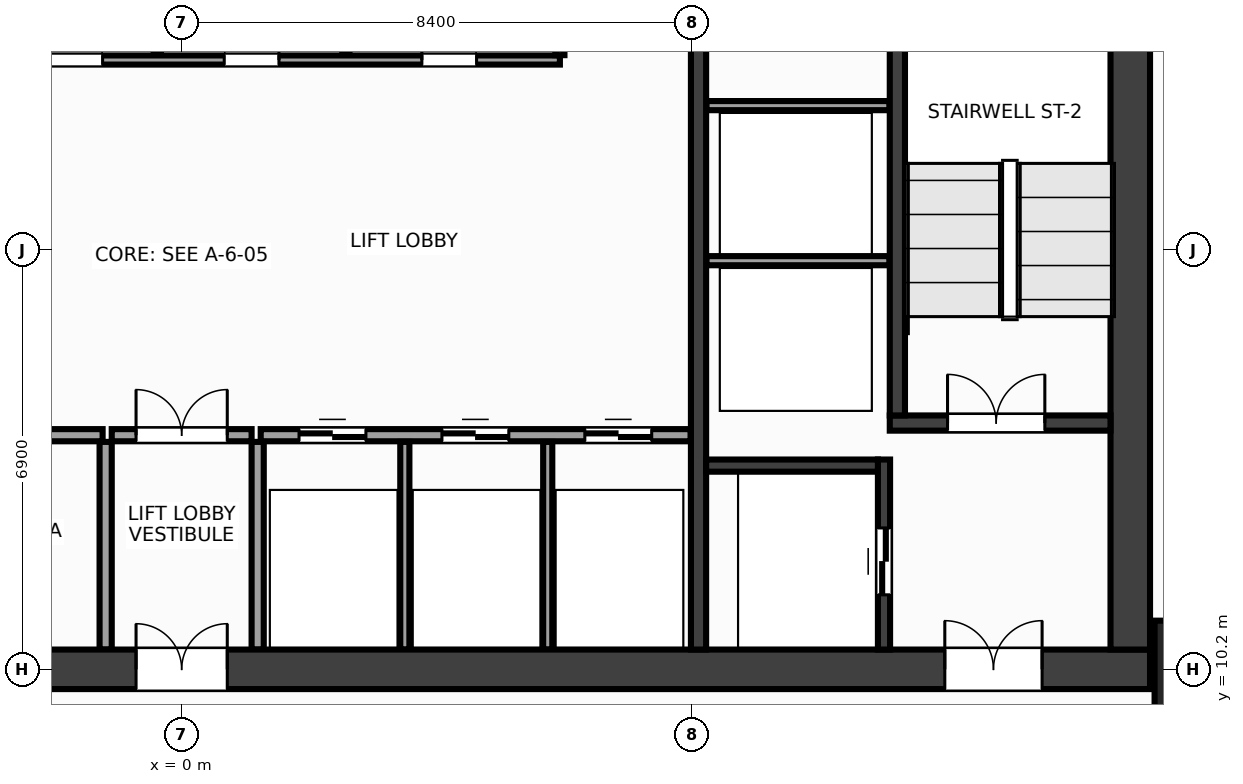
"""IFC4 building model, lengths in metres.
Left out: names, types, materials, properties, quantities, classifications, styles, units other than length and angle.
Written with IfcOpenShell. Run it as: python <this file> out.ifc"""

import sys

from ifc_helpers import new_model, si_unit, direction, frame, frame_2d, origin, origin_2d, place, context, subcontext, project, spatial, rectangle, extrude, source, transform, mapped, element, fill, save


model = new_model("IFC4")
c1 = context("Model", 3, precision=1e-05, world=origin(), true_north=direction((0.0, 1.0)))
c2 = subcontext(c1, "Body", "Model", "MODEL_VIEW")
j1 = project(units=[si_unit("LENGTHUNIT", "METRE"), si_unit("PLANEANGLEUNIT", "RADIAN")], contexts=[c1])
p1 = place(None, origin())
s1 = spatial("IfcSite", under=j1, at=p1, CompositionType="ELEMENT")
p2 = place(p1, origin())
s2 = spatial("IfcBuilding", under=s1, at=p2, CompositionType="ELEMENT")
p3 = place(p2, frame((0.0, 0.0, 135.2)))
s3 = spatial("IfcBuildingStorey", under=s2, at=p3, CompositionType="ELEMENT", Elevation=135.2)
m1 = source(origin(), c2, "Body", "SweptSolid", [
    extrude(rectangle(XDim=31.85, YDim=0.65, at=frame_2d((15.925, 0.0))), origin(), (0.0, 0.0, 1.0), 3.6),
])
p4 = place(p3, frame((-15.925, 10.2, 0.0), z_axis=(0.0, 0.0, 1.0), x_axis=(1.0, 0.0, 0.0)))
e1 = element("IfcWall", 1, at=p4, inside=s3, PredefinedType="SHEAR", context=c2, shape_type="MappedRepresentation", body=[
    mapped(m1, transform((0.0, 0.0, 0.0), x_axis=(1.0, 0.0, 0.0), y_axis=(0.0, 1.0, 0.0), z_axis=(0.0, 0.0, 1.0), scale=1.0)),
])
p5 = place(p4, frame((1.775, 0.0, 0.0)))
e2 = element("IfcOpeningElement", 2, at=p5, cuts=e1, PredefinedType="OPENING", context=c2, shape_type="SweptSolid", body=[
    extrude(rectangle(XDim=1.6, YDim=2.15, at=frame_2d((0.8, 1.075))), frame((0.0, 0.337, 0.0), z_axis=(0.0, -1.0, 0.0), x_axis=(1.0, 0.0, 0.0)), (0.0, 0.0, 1.0), 0.674),
])
p6 = place(p4, frame((28.475, 0.0, 0.0)))
e3 = element("IfcOpeningElement", 3, at=p6, cuts=e1, PredefinedType="OPENING", context=c2, shape_type="SweptSolid", body=[
    extrude(rectangle(XDim=1.6, YDim=2.15, at=frame_2d((0.8, 1.075))), frame((0.0, 0.337, 0.0), z_axis=(0.0, -1.0, 0.0), x_axis=(1.0, 0.0, 0.0)), (0.0, 0.0, 1.0), 0.674),
])
p7 = place(p4, frame((15.175, 0.0, 0.0)))
e4 = element("IfcOpeningElement", 4, at=p7, cuts=e1, PredefinedType="OPENING", context=c2, shape_type="SweptSolid", body=[
    extrude(rectangle(XDim=1.5, YDim=2.2, at=frame_2d((0.75, 1.1))), frame((0.0, 0.337, 0.0), z_axis=(0.0, -1.0, 0.0), x_axis=(1.0, 0.0, 0.0)), (0.0, 0.0, 1.0), 0.674),
])
m2 = source(origin(), c2, "Body", "SweptSolid", [
    extrude(rectangle(XDim=12.95, YDim=0.65, at=frame_2d((6.475, 0.0))), origin(), (0.0, 0.0, 1.0), 3.6),
])
p8 = place(p3, frame((15.6, 10.525, 0.0), z_axis=(0.0, 0.0, 1.0), x_axis=(0.0, 1.0, 0.0)))
e5 = element("IfcWall", 5, at=p8, inside=s3, PredefinedType="SHEAR", context=c2, shape_type="MappedRepresentation", body=[
    mapped(m2, transform((0.0, 0.0, 0.0), x_axis=(1.0, 0.0, 0.0), y_axis=(0.0, 1.0, 0.0), z_axis=(0.0, 0.0, 1.0), scale=1.0)),
])
m3 = source(origin(), c2, "Body", "SweptSolid", [
    extrude(rectangle(XDim=12.95, YDim=0.25, at=frame_2d((6.475, 0.0))), origin(), (0.0, 0.0, 1.0), 3.6),
])
p9 = place(p3, frame((8.5, 10.525, 0.0), z_axis=(0.0, 0.0, 1.0), x_axis=(0.0, 1.0, 0.0)))
e6 = element("IfcWall", 6, at=p9, inside=s3, PredefinedType="SHEAR", context=c2, shape_type="MappedRepresentation", body=[
    mapped(m3, transform((0.0, 0.0, 0.0), x_axis=(1.0, 0.0, 0.0), y_axis=(0.0, 1.0, 0.0), z_axis=(0.0, 0.0, 1.0), scale=1.0)),
])
p10 = place(p9, frame((9.925, 0.0, 0.0)))
e7 = element("IfcOpeningElement", 7, at=p10, cuts=e6, PredefinedType="OPENING", context=c2, shape_type="SweptSolid", body=[
    extrude(rectangle(XDim=0.95, YDim=2.15, at=frame_2d((0.475, 1.075))), frame((0.0, 0.137, 0.0), z_axis=(0.0, -1.0, 0.0), x_axis=(1.0, 0.0, 0.0)), (0.0, 0.0, 1.0), 0.274),
])
m4 = source(origin(), c2, "Body", "SweptSolid", [
    extrude(rectangle(XDim=3.63, YDim=0.25, at=frame_2d((1.815, 0.0))), origin(), (0.0, 0.0, 1.0), 3.6),
])
p11 = place(p3, frame((11.645, 14.25, 0.0), z_axis=(0.0, 0.0, 1.0), x_axis=(1.0, 0.0, 0.0)))
e8 = element("IfcWall", 8, at=p11, inside=s3, PredefinedType="SHEAR", context=c2, shape_type="MappedRepresentation", body=[
    mapped(m4, transform((0.0, 0.0, 0.0), x_axis=(1.0, 0.0, 0.0), y_axis=(0.0, 1.0, 0.0), z_axis=(0.0, 0.0, 1.0), scale=1.0)),
])
p12 = place(p11, frame((0.95, 0.0, 0.0)))
e9 = element("IfcOpeningElement", 9, at=p12, cuts=e8, PredefinedType="OPENING", context=c2, shape_type="SweptSolid", body=[
    extrude(rectangle(XDim=1.6, YDim=2.15, at=frame_2d((0.8, 1.075))), frame((0.0, 0.137, 0.0), z_axis=(0.0, -1.0, 0.0), x_axis=(1.0, 0.0, 0.0)), (0.0, 0.0, 1.0), 0.274),
])
m5 = source(origin(), c2, "Body", "SweptSolid", [
    extrude(rectangle(XDim=9.1, YDim=0.25, at=frame_2d((4.55, 0.0))), origin(), (0.0, 0.0, 1.0), 3.6),
])
p13 = place(p3, frame((11.77, 14.375, 0.0), z_axis=(0.0, 0.0, 1.0), x_axis=(0.0, 1.0, 0.0)))
e10 = element("IfcWall", 10, at=p13, inside=s3, PredefinedType="SHEAR", context=c2, shape_type="MappedRepresentation", body=[
    mapped(m5, transform((0.0, 0.0, 0.0), x_axis=(1.0, 0.0, 0.0), y_axis=(0.0, 1.0, 0.0), z_axis=(0.0, 0.0, 1.0), scale=1.0)),
])
m6 = source(origin(), c2, "Body", "SweptSolid", [
    extrude(rectangle(XDim=3.125, YDim=0.2, at=frame_2d((1.562, 0.0))), origin(), (0.0, 0.0, 1.0), 3.6),
])
p14 = place(p3, frame((11.55, 10.525, 0.0), z_axis=(0.0, 0.0, 1.0), x_axis=(0.0, 1.0, 0.0)))
e11 = element("IfcWall", 11, at=p14, inside=s3, PredefinedType="SHEAR", context=c2, shape_type="MappedRepresentation", body=[
    mapped(m6, transform((0.0, 0.0, 0.0), x_axis=(1.0, 0.0, 0.0), y_axis=(0.0, 1.0, 0.0), z_axis=(0.0, 0.0, 1.0), scale=1.0)),
])
p15 = place(p14, frame((0.9, 0.0, 0.0)))
e12 = element("IfcOpeningElement", 12, at=p15, cuts=e11, PredefinedType="OPENING", context=c2, shape_type="SweptSolid", body=[
    extrude(rectangle(XDim=1.1, YDim=2.15, at=frame_2d((0.55, 1.075))), frame((0.0, 0.112, 0.0), z_axis=(0.0, -1.0, 0.0), x_axis=(1.0, 0.0, 0.0)), (0.0, 0.0, 1.0), 0.224),
])
m7 = source(origin(), c2, "Body", "SweptSolid", [
    extrude(rectangle(XDim=2.825, YDim=0.2, at=frame_2d((1.413, 0.0))), origin(), (0.0, 0.0, 1.0), 3.6),
])
p16 = place(p3, frame((8.625, 13.55, 0.0), z_axis=(0.0, 0.0, 1.0), x_axis=(1.0, 0.0, 0.0)))
e13 = element("IfcWall", 13, at=p16, inside=s3, PredefinedType="SHEAR", context=c2, shape_type="MappedRepresentation", body=[
    mapped(m7, transform((0.0, 0.0, 0.0), x_axis=(1.0, 0.0, 0.0), y_axis=(0.0, 1.0, 0.0), z_axis=(0.0, 0.0, 1.0), scale=1.0)),
])
m8 = source(origin(), c2, "Body", "SweptSolid", [
    extrude(rectangle(XDim=1.6, YDim=1.6, at=origin_2d()), origin(), (0.0, 0.0, 1.0), 3.6),
])
p17 = place(p3, frame((16.8, 10.2, 0.0), z_axis=(0.0, 0.0, 1.0), x_axis=(1.0, 0.0, 0.0)))
e14 = element("IfcColumn", 14, at=p17, inside=s3, PredefinedType="COLUMN", context=c2, shape_type="MappedRepresentation", body=[
    mapped(m8, transform((0.0, 0.0, 0.0), x_axis=(1.0, 0.0, 0.0), y_axis=(0.0, 1.0, 0.0), z_axis=(0.0, 0.0, 1.0), scale=1.0)),
])
m9 = source(origin(), c2, "Body", "SweptSolid", [
    extrude(rectangle(XDim=3.01, YDim=0.15, at=frame_2d((1.505, 0.0))), origin(), (0.0, 0.0, 1.0), 3.38),
])
for number, where, z_axis, x_axis in (
    (15, (8.63, 16.92, 0.0), (0.0, 0.0, 1.0), (1.0, 0.0, 0.0)),
    (16, (8.63, 19.47, 0.0), (0.0, 0.0, 1.0), (1.0, 0.0, 0.0)),
):
    element("IfcWall", number, at=place(p3, frame(where, z_axis=z_axis, x_axis=x_axis)), inside=s3, PredefinedType="PARTITIONING", context=c2, shape_type="MappedRepresentation", body=[
        mapped(m9, transform((0.0, 0.0, 0.0), x_axis=(1.0, 0.0, 0.0), y_axis=(0.0, 1.0, 0.0), z_axis=(0.0, 0.0, 1.0), scale=1.0)),
    ])
m10 = source(origin(), c2, "Body", "SweptSolid", [
    extrude(rectangle(XDim=7.07, YDim=0.2, at=frame_2d((3.535, 0.0))), origin(), (0.0, 0.0, 1.0), 3.38),
])
p18 = place(p3, frame((-8.37, 14.05, 0.0), z_axis=(0.0, 0.0, 1.0), x_axis=(1.0, 0.0, 0.0)))
e17 = element("IfcWall", 17, at=p18, inside=s3, PredefinedType="PARTITIONING", context=c2, shape_type="MappedRepresentation", body=[
    mapped(m10, transform((0.0, 0.0, 0.0), x_axis=(1.0, 0.0, 0.0), y_axis=(0.0, 1.0, 0.0), z_axis=(0.0, 0.0, 1.0), scale=1.0)),
])
p19 = place(p18, frame((1.06, 0.0, 0.0)))
e18 = element("IfcOpeningElement", 18, at=p19, cuts=e17, PredefinedType="OPENING", context=c2, shape_type="SweptSolid", body=[
    extrude(rectangle(XDim=0.9, YDim=2.15, at=frame_2d((0.45, 1.075))), frame((0.0, 0.112, 0.0), z_axis=(0.0, -1.0, 0.0), x_axis=(1.0, 0.0, 0.0)), (0.0, 0.0, 1.0), 0.224),
])
p20 = place(p18, frame((4.51, 0.0, 0.0)))
e19 = element("IfcOpeningElement", 19, at=p20, cuts=e17, PredefinedType="OPENING", context=c2, shape_type="SweptSolid", body=[
    extrude(rectangle(XDim=0.9, YDim=2.15, at=frame_2d((0.45, 1.075))), frame((0.0, 0.112, 0.0), z_axis=(0.0, -1.0, 0.0), x_axis=(1.0, 0.0, 0.0)), (0.0, 0.0, 1.0), 0.224),
])
p21 = place(p3, frame((1.3, 14.05, 0.0), z_axis=(0.0, 0.0, 1.0), x_axis=(1.0, 0.0, 0.0)))
e20 = element("IfcWall", 20, at=p21, inside=s3, PredefinedType="PARTITIONING", context=c2, shape_type="MappedRepresentation", body=[
    mapped(m10, transform((0.0, 0.0, 0.0), x_axis=(1.0, 0.0, 0.0), y_axis=(0.0, 1.0, 0.0), z_axis=(0.0, 0.0, 1.0), scale=1.0)),
])
p22 = place(p21, frame((0.63, 0.0, 0.0)))
e21 = element("IfcOpeningElement", 21, at=p22, cuts=e20, PredefinedType="OPENING", context=c2, shape_type="SweptSolid", body=[
    extrude(rectangle(XDim=1.1, YDim=2.15, at=frame_2d((0.55, 1.075))), frame((0.0, 0.112, 0.0), z_axis=(0.0, -1.0, 0.0), x_axis=(1.0, 0.0, 0.0)), (0.0, 0.0, 1.0), 0.224),
])
p23 = place(p21, frame((2.98, 0.0, 0.0)))
e22 = element("IfcOpeningElement", 22, at=p23, cuts=e20, PredefinedType="OPENING", context=c2, shape_type="SweptSolid", body=[
    extrude(rectangle(XDim=1.1, YDim=2.15, at=frame_2d((0.55, 1.075))), frame((0.0, 0.112, 0.0), z_axis=(0.0, -1.0, 0.0), x_axis=(1.0, 0.0, 0.0)), (0.0, 0.0, 1.0), 0.224),
])
p24 = place(p21, frame((5.33, 0.0, 0.0)))
e23 = element("IfcOpeningElement", 23, at=p24, cuts=e20, PredefinedType="OPENING", context=c2, shape_type="SweptSolid", body=[
    extrude(rectangle(XDim=1.1, YDim=2.15, at=frame_2d((0.55, 1.075))), frame((0.0, 0.112, 0.0), z_axis=(0.0, -1.0, 0.0), x_axis=(1.0, 0.0, 0.0)), (0.0, 0.0, 1.0), 0.224),
])
m11 = source(origin(), c2, "Body", "SweptSolid", [
    extrude(rectangle(XDim=3.415, YDim=0.2, at=frame_2d((1.708, 0.0))), origin(), (0.0, 0.0, 1.0), 3.38),
])
for number, where, z_axis, x_axis in (
    (24, (-1.25, 10.525, 0.0), (0.0, 0.0, 1.0), (0.0, 1.0, 0.0)),
    (25, (1.25, 10.525, 0.0), (0.0, 0.0, 1.0), (0.0, 1.0, 0.0)),
):
    element("IfcWall", number, at=place(p3, frame(where, z_axis=z_axis, x_axis=x_axis)), inside=s3, PredefinedType="PARTITIONING", context=c2, shape_type="MappedRepresentation", body=[
        mapped(m11, transform((0.0, 0.0, 0.0), x_axis=(1.0, 0.0, 0.0), y_axis=(0.0, 1.0, 0.0), z_axis=(0.0, 0.0, 1.0), scale=1.0)),
    ])
m12 = source(origin(), c2, "Body", "SweptSolid", [
    extrude(rectangle(XDim=2.3, YDim=0.2, at=frame_2d((1.15, 0.0))), origin(), (0.0, 0.0, 1.0), 3.38),
])
p25 = place(p3, frame((-1.15, 14.05, 0.0), z_axis=(0.0, 0.0, 1.0), x_axis=(1.0, 0.0, 0.0)))
e26 = element("IfcWall", 26, at=p25, inside=s3, PredefinedType="PARTITIONING", context=c2, shape_type="MappedRepresentation", body=[
    mapped(m12, transform((0.0, 0.0, 0.0), x_axis=(1.0, 0.0, 0.0), y_axis=(0.0, 1.0, 0.0), z_axis=(0.0, 0.0, 1.0), scale=1.0)),
])
p26 = place(p25, frame((0.4, 0.0, 0.0)))
e27 = element("IfcOpeningElement", 27, at=p26, cuts=e26, PredefinedType="OPENING", context=c2, shape_type="SweptSolid", body=[
    extrude(rectangle(XDim=1.5, YDim=2.2, at=frame_2d((0.75, 1.1))), frame((0.0, 0.112, 0.0), z_axis=(0.0, -1.0, 0.0), x_axis=(1.0, 0.0, 0.0)), (0.0, 0.0, 1.0), 0.224),
])
m13 = source(origin(), c2, "Body", "SweptSolid", [
    extrude(rectangle(XDim=14.59, YDim=0.15, at=frame_2d((7.295, 0.0))), origin(), (0.0, 0.0, 1.0), 3.38),
])
p27 = place(p3, frame((-8.37, 20.22, 0.0), z_axis=(0.0, 0.0, 1.0), x_axis=(1.0, 0.0, 0.0)))
e28 = element("IfcWall", 28, at=p27, inside=s3, PredefinedType="PARTITIONING", context=c2, shape_type="MappedRepresentation", body=[
    mapped(m13, transform((0.0, 0.0, 0.0), x_axis=(1.0, 0.0, 0.0), y_axis=(0.0, 1.0, 0.0), z_axis=(0.0, 0.0, 1.0), scale=1.0)),
])
p28 = place(p27, frame((0.86, 0.0, 0.0)))
e29 = element("IfcOpeningElement", 29, at=p28, cuts=e28, PredefinedType="OPENING", context=c2, shape_type="SweptSolid", body=[
    extrude(rectangle(XDim=0.9, YDim=2.15, at=frame_2d((0.45, 1.075))), frame((0.0, 0.087, 0.0), z_axis=(0.0, -1.0, 0.0), x_axis=(1.0, 0.0, 0.0)), (0.0, 0.0, 1.0), 0.174),
])
p29 = place(p27, frame((3.47, 0.0, 0.0)))
e30 = element("IfcOpeningElement", 30, at=p29, cuts=e28, PredefinedType="OPENING", context=c2, shape_type="SweptSolid", body=[
    extrude(rectangle(XDim=0.9, YDim=2.15, at=frame_2d((0.45, 1.075))), frame((0.0, 0.087, 0.0), z_axis=(0.0, -1.0, 0.0), x_axis=(1.0, 0.0, 0.0)), (0.0, 0.0, 1.0), 0.174),
])
p30 = place(p27, frame((6.17, 0.0, 0.0)))
e31 = element("IfcOpeningElement", 31, at=p30, cuts=e28, PredefinedType="OPENING", context=c2, shape_type="SweptSolid", body=[
    extrude(rectangle(XDim=0.9, YDim=2.15, at=frame_2d((0.45, 1.075))), frame((0.0, 0.087, 0.0), z_axis=(0.0, -1.0, 0.0), x_axis=(1.0, 0.0, 0.0)), (0.0, 0.0, 1.0), 0.174),
])
p31 = place(p27, frame((9.07, 0.0, 0.0)))
e32 = element("IfcOpeningElement", 32, at=p31, cuts=e28, PredefinedType="OPENING", context=c2, shape_type="SweptSolid", body=[
    extrude(rectangle(XDim=0.9, YDim=2.15, at=frame_2d((0.45, 1.075))), frame((0.0, 0.087, 0.0), z_axis=(0.0, -1.0, 0.0), x_axis=(1.0, 0.0, 0.0)), (0.0, 0.0, 1.0), 0.174),
])
p32 = place(p27, frame((12.32, 0.0, 0.0)))
e33 = element("IfcOpeningElement", 33, at=p32, cuts=e28, PredefinedType="OPENING", context=c2, shape_type="SweptSolid", body=[
    extrude(rectangle(XDim=0.9, YDim=2.15, at=frame_2d((0.45, 1.075))), frame((0.0, 0.087, 0.0), z_axis=(0.0, -1.0, 0.0), x_axis=(1.0, 0.0, 0.0)), (0.0, 0.0, 1.0), 0.174),
])
m14 = source(origin(), c2, "Body", "SweptSolid", [
    extrude(rectangle(XDim=1.55, YDim=0.15, at=frame_2d((0.775, 0.0))), origin(), (0.0, 0.0, 1.0), 3.38),
])
p33 = place(p3, frame((6.22, 20.3, 0.0), z_axis=(0.0, 0.0, 1.0), x_axis=(0.0, 1.0, 0.0)))
e34 = element("IfcWall", 34, at=p33, inside=s3, PredefinedType="PARTITIONING", context=c2, shape_type="MappedRepresentation", body=[
    mapped(m14, transform((0.0, 0.0, 0.0), x_axis=(1.0, 0.0, 0.0), y_axis=(0.0, 1.0, 0.0), z_axis=(0.0, 0.0, 1.0), scale=1.0)),
])
m15 = source(origin(), c2, "Body", "SweptSolid", [
    extrude(rectangle(XDim=3.415, YDim=0.15, at=frame_2d((1.708, 0.0))), origin(), (0.0, 0.0, 1.0), 3.38),
])
for number, where, z_axis, x_axis in (
    (35, (3.67, 10.525, 0.0), (0.0, 0.0, 1.0), (0.0, 1.0, 0.0)),
    (36, (6.02, 10.525, 0.0), (0.0, 0.0, 1.0), (0.0, 1.0, 0.0)),
):
    element("IfcWall", number, at=place(p3, frame(where, z_axis=z_axis, x_axis=x_axis)), inside=s3, PredefinedType="PARTITIONING", context=c2, shape_type="MappedRepresentation", body=[
        mapped(m15, transform((0.0, 0.0, 0.0), x_axis=(1.0, 0.0, 0.0), y_axis=(0.0, 1.0, 0.0), z_axis=(0.0, 0.0, 1.0), scale=1.0)),
    ])
m16 = source(origin(), c2, "Body", "SweptSolid", [
    extrude(rectangle(XDim=3.115, YDim=0.12, at=frame_2d((1.558, 0.0))), origin(), (0.0, 0.0, 1.0), 3.38),
])
for number, where, z_axis, x_axis in (
    (37, (-0.4, 20.32, 0.0), (0.0, 0.0, 1.0), (0.0, 1.0, 0.0)),
    (38, (2.7, 20.32, 0.0), (0.0, 0.0, 1.0), (0.0, 1.0, 0.0)),
):
    element("IfcWall", number, at=place(p3, frame(where, z_axis=z_axis, x_axis=x_axis)), inside=s3, PredefinedType="PARTITIONING", context=c2, shape_type="MappedRepresentation", body=[
        mapped(m16, transform((0.0, 0.0, 0.0), x_axis=(1.0, 0.0, 0.0), y_axis=(0.0, 1.0, 0.0), z_axis=(0.0, 0.0, 1.0), scale=1.0)),
    ])
m17 = source(origin(), c2, "Body", "SweptSolid", [
    extrude(rectangle(XDim=1.6, YDim=2.15, at=frame_2d((0.8, 1.075))), frame((0.0, 0.025, 0.0), z_axis=(0.0, -1.0, 0.0), x_axis=(1.0, 0.0, 0.0)), (0.0, 0.0, 1.0), 0.05),
])
p34 = place(p12, origin())
e39 = element("IfcDoor", 39, at=p34, inside=s3, OperationType="DOUBLE_DOOR_SINGLE_SWING", PredefinedType="DOOR", context=c2, shape_type="MappedRepresentation", body=[
    mapped(m17, transform((0.0, 0.0, 0.0), x_axis=(1.0, 0.0, 0.0), y_axis=(0.0, 1.0, 0.0), z_axis=(0.0, 0.0, 1.0), scale=1.0)),
])
fill(e9, e39)
p35 = place(p6, origin())
e40 = element("IfcDoor", 40, at=p35, inside=s3, OperationType="DOUBLE_DOOR_SINGLE_SWING", PredefinedType="DOOR", context=c2, shape_type="MappedRepresentation", body=[
    mapped(m17, transform((0.0, 0.0, 0.0), x_axis=(1.0, 0.0, 0.0), y_axis=(0.0, 1.0, 0.0), z_axis=(0.0, 0.0, 1.0), scale=1.0)),
])
fill(e3, e40)
m18 = source(origin(), c2, "Body", "SweptSolid", [
    extrude(rectangle(XDim=1.1, YDim=2.15, at=frame_2d((0.55, 1.075))), frame((0.0, 0.025, 0.0), z_axis=(0.0, -1.0, 0.0), x_axis=(1.0, 0.0, 0.0)), (0.0, 0.0, 1.0), 0.05),
])
p36 = place(p15, origin())
e41 = element("IfcDoor", 41, at=p36, inside=s3, OperationType="DOUBLE_DOOR_SLIDING", PredefinedType="DOOR", context=c2, shape_type="MappedRepresentation", body=[
    mapped(m18, transform((0.0, 0.0, 0.0), x_axis=(1.0, 0.0, 0.0), y_axis=(0.0, 1.0, 0.0), z_axis=(0.0, 0.0, 1.0), scale=1.0)),
])
fill(e12, e41)
p37 = place(p22, origin())
e42 = element("IfcDoor", 42, at=p37, inside=s3, OperationType="DOUBLE_DOOR_SLIDING", PredefinedType="DOOR", context=c2, shape_type="MappedRepresentation", body=[
    mapped(m18, transform((0.0, 0.0, 0.0), x_axis=(1.0, 0.0, 0.0), y_axis=(0.0, 1.0, 0.0), z_axis=(0.0, 0.0, 1.0), scale=1.0)),
])
fill(e21, e42)
p38 = place(p23, origin())
e43 = element("IfcDoor", 43, at=p38, inside=s3, OperationType="DOUBLE_DOOR_SLIDING", PredefinedType="DOOR", context=c2, shape_type="MappedRepresentation", body=[
    mapped(m18, transform((0.0, 0.0, 0.0), x_axis=(1.0, 0.0, 0.0), y_axis=(0.0, 1.0, 0.0), z_axis=(0.0, 0.0, 1.0), scale=1.0)),
])
fill(e22, e43)
p39 = place(p24, origin())
e44 = element("IfcDoor", 44, at=p39, inside=s3, OperationType="DOUBLE_DOOR_SLIDING", PredefinedType="DOOR", context=c2, shape_type="MappedRepresentation", body=[
    mapped(m18, transform((0.0, 0.0, 0.0), x_axis=(1.0, 0.0, 0.0), y_axis=(0.0, 1.0, 0.0), z_axis=(0.0, 0.0, 1.0), scale=1.0)),
])
fill(e23, e44)
m19 = source(origin(), c2, "Body", "SweptSolid", [
    extrude(rectangle(XDim=1.5, YDim=2.2, at=frame_2d((0.75, 1.1))), frame((0.0, 0.025, 0.0), z_axis=(0.0, -1.0, 0.0), x_axis=(1.0, 0.0, 0.0)), (0.0, 0.0, 1.0), 0.05),
])
p40 = place(p26, origin())
e45 = element("IfcDoor", 45, at=p40, inside=s3, OperationType="DOUBLE_DOOR_SINGLE_SWING", PredefinedType="DOOR", context=c2, shape_type="MappedRepresentation", body=[
    mapped(m19, transform((0.0, 0.0, 0.0), x_axis=(1.0, 0.0, 0.0), y_axis=(0.0, 1.0, 0.0), z_axis=(0.0, 0.0, 1.0), scale=1.0)),
])
fill(e27, e45)
p41 = place(p7, origin())
e46 = element("IfcDoor", 46, at=p41, inside=s3, OperationType="DOUBLE_DOOR_SINGLE_SWING", PredefinedType="DOOR", context=c2, shape_type="MappedRepresentation", body=[
    mapped(m19, transform((0.0, 0.0, 0.0), x_axis=(1.0, 0.0, 0.0), y_axis=(0.0, 1.0, 0.0), z_axis=(0.0, 0.0, 1.0), scale=1.0)),
])
fill(e4, e46)
m20 = source(origin(), c2, "Body", "SweptSolid", [
    extrude(rectangle(XDim=0.9, YDim=2.15, at=frame_2d((0.45, 1.075))), frame((0.0, 0.025, 0.0), z_axis=(0.0, -1.0, 0.0), x_axis=(1.0, 0.0, 0.0)), (0.0, 0.0, 1.0), 0.05),
])
p42 = place(p30, origin())
e47 = element("IfcDoor", 47, at=p42, inside=s3, OperationType="SINGLE_SWING_LEFT", PredefinedType="DOOR", context=c2, shape_type="MappedRepresentation", body=[
    mapped(m20, transform((0.0, 0.0, 0.0), x_axis=(1.0, 0.0, 0.0), y_axis=(0.0, 1.0, 0.0), z_axis=(0.0, 0.0, 1.0), scale=1.0)),
])
fill(e31, e47)
p43 = place(p31, origin())
e48 = element("IfcDoor", 48, at=p43, inside=s3, OperationType="SINGLE_SWING_RIGHT", PredefinedType="DOOR", context=c2, shape_type="MappedRepresentation", body=[
    mapped(m20, transform((0.0, 0.0, 0.0), x_axis=(1.0, 0.0, 0.0), y_axis=(0.0, 1.0, 0.0), z_axis=(0.0, 0.0, 1.0), scale=1.0)),
])
fill(e32, e48)
p44 = place(p32, origin())
e49 = element("IfcDoor", 49, at=p44, inside=s3, OperationType="SINGLE_SWING_LEFT", PredefinedType="DOOR", context=c2, shape_type="MappedRepresentation", body=[
    mapped(m20, transform((0.0, 0.0, 0.0), x_axis=(1.0, 0.0, 0.0), y_axis=(0.0, 1.0, 0.0), z_axis=(0.0, 0.0, 1.0), scale=1.0)),
])
fill(e33, e49)
save(model, sys.argv[1])
